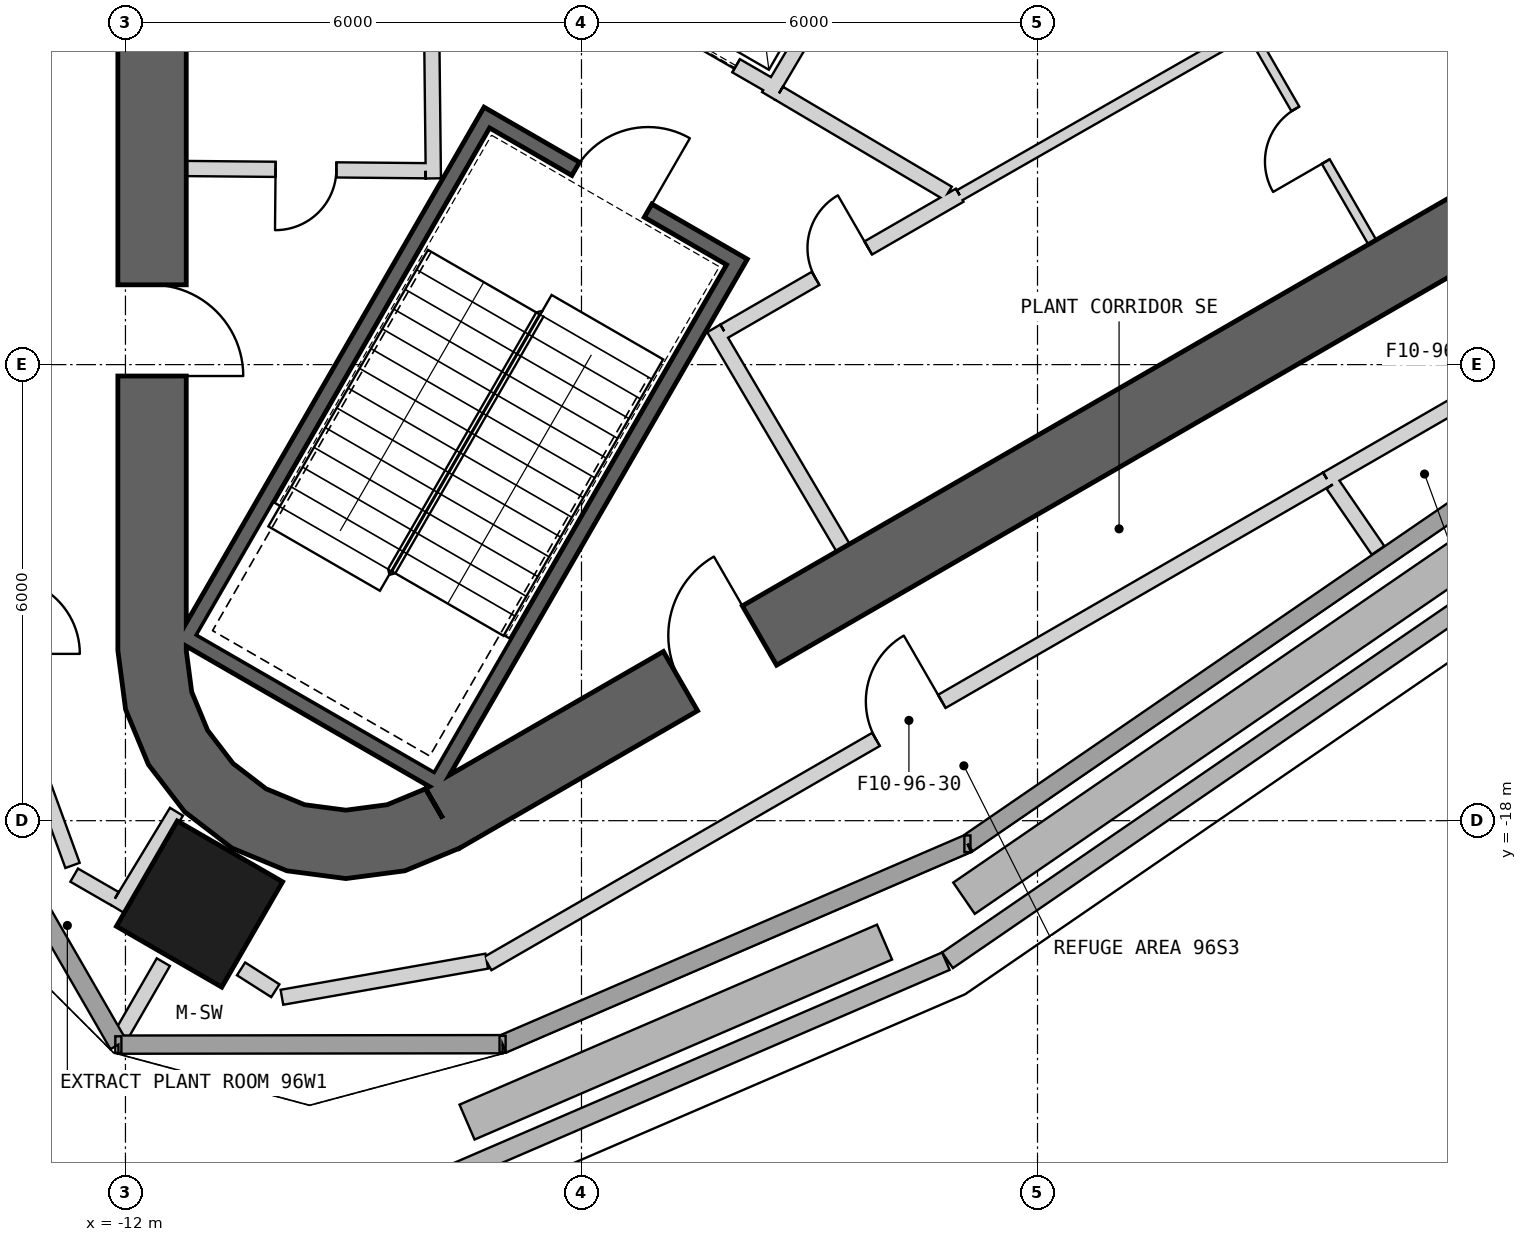
"""IFC4 building model, lengths in metres.
Left out: names, types, materials, properties, quantities, classifications, styles, units other than length and angle.
Written with IfcOpenShell. Run it as: python <this file> out.ifc"""

import sys

from ifc_helpers import new_model, si_unit, direction, frame, frame_2d, origin, origin_2d, place, context, subcontext, project, spatial, polyline, rectangle, outline, extrude, element, fill, save


model = new_model("IFC4")
c1 = context("Model", 3, precision=1e-05, world=origin(), true_north=direction((0.0, 1.0)))
c2 = subcontext(c1, "Body", "Model", "MODEL_VIEW")
j1 = project(units=[si_unit("LENGTHUNIT", "METRE"), si_unit("PLANEANGLEUNIT", "RADIAN")], contexts=[c1])
p1 = place(None, origin())
s1 = spatial("IfcSite", under=j1, at=p1, CompositionType="ELEMENT")
p2 = place(p1, origin())
s2 = spatial("IfcBuilding", under=s1, at=p2, CompositionType="ELEMENT")
p3 = place(p2, frame((0.0, 0.0, 425.3)))
s3 = spatial("IfcBuildingStorey", under=s2, at=p3, CompositionType="ELEMENT", Elevation=425.3)
p4 = place(p3, frame((-11.025, -19.097, -0.25), z_axis=(0.0, 0.0, 1.0), x_axis=(-0.5, -0.866025403784, 0.0)))
e1 = element("IfcColumn", 1, at=p4, inside=s3, PredefinedType="COLUMN", context=c2, shape_type="SweptSolid", body=[
    extrude(rectangle(XDim=1.6, YDim=1.6, at=origin_2d()), origin(), (0.0, 0.0, 1.0), 5.25),
])
p5 = place(p3, frame((-11.65, 15.762, 0.0), z_axis=(0.0, 0.0, 1.0), x_axis=(0.0, -1.0, 0.0)))
e2 = element("IfcWall", 2, at=p5, inside=s3, PredefinedType="SHEAR", context=c2, shape_type="SweptSolid", body=[
    extrude(rectangle(XDim=31.523, YDim=0.9, at=frame_2d((15.762, 0.0))), origin(), (0.0, 0.0, 1.0), 5.0),
])
p6 = place(p5, frame((3.612, 0.0, 0.0)))
e3 = element("IfcOpeningElement", 3, at=p6, cuts=e2, PredefinedType="OPENING", context=c2, shape_type="SweptSolid", body=[
    extrude(rectangle(XDim=1.2, YDim=2.4, at=frame_2d((0.6, 1.2))), frame((0.0, 0.46, 0.0), z_axis=(0.0, -1.0, 0.0), x_axis=(1.0, 0.0, 0.0)), (0.0, 0.0, 1.0), 0.92),
])
p7 = place(p5, frame((26.712, 0.0, 0.0)))
e4 = element("IfcOpeningElement", 4, at=p7, cuts=e2, PredefinedType="OPENING", context=c2, shape_type="SweptSolid", body=[
    extrude(rectangle(XDim=1.2, YDim=2.4, at=frame_2d((0.6, 1.2))), frame((0.0, 0.46, 0.0), z_axis=(0.0, -1.0, 0.0), x_axis=(1.0, 0.0, 0.0)), (0.0, 0.0, 1.0), 0.92),
])
p8 = place(p3, frame((-7.825, -17.97, 0.0), z_axis=(0.0, 0.0, 1.0), x_axis=(0.866028369851, 0.499994862586, 0.0)))
e5 = element("IfcWall", 5, at=p8, inside=s3, PredefinedType="SHEAR", context=c2, shape_type="SweptSolid", body=[
    extrude(rectangle(XDim=31.523, YDim=0.9, at=frame_2d((15.762, 0.0))), origin(), (0.0, 0.0, 1.0), 5.0),
])
p9 = place(p8, frame((17.862, 0.0, 0.0)))
e6 = element("IfcOpeningElement", 6, at=p9, cuts=e5, PredefinedType="OPENING", context=c2, shape_type="SweptSolid", body=[
    extrude(rectangle(XDim=1.2, YDim=2.4, at=frame_2d((0.6, 1.2))), frame((0.0, 0.46, 0.0), z_axis=(0.0, -1.0, 0.0), x_axis=(1.0, 0.0, 0.0)), (0.0, 0.0, 1.0), 0.92),
])
p10 = place(p8, frame((20.562, 0.0, 0.0)))
e7 = element("IfcOpeningElement", 7, at=p10, cuts=e5, PredefinedType="OPENING", context=c2, shape_type="SweptSolid", body=[
    extrude(rectangle(XDim=1.2, YDim=2.4, at=frame_2d((0.6, 1.2))), frame((0.0, 0.46, 0.0), z_axis=(0.0, -1.0, 0.0), x_axis=(1.0, 0.0, 0.0)), (0.0, 0.0, 1.0), 0.92),
])
p11 = place(p8, frame((26.712, 0.0, 0.0)))
e8 = element("IfcOpeningElement", 8, at=p11, cuts=e5, PredefinedType="OPENING", context=c2, shape_type="SweptSolid", body=[
    extrude(rectangle(XDim=1.2, YDim=2.4, at=frame_2d((0.6, 1.2))), frame((0.0, 0.46, 0.0), z_axis=(0.0, -1.0, 0.0), x_axis=(1.0, 0.0, 0.0)), (0.0, 0.0, 1.0), 0.92),
])
p12 = place(p8, frame((3.612, 0.0, 0.0)))
e9 = element("IfcOpeningElement", 9, at=p12, cuts=e5, PredefinedType="OPENING", context=c2, shape_type="SweptSolid", body=[
    extrude(rectangle(XDim=1.2, YDim=2.4, at=frame_2d((0.6, 1.2))), frame((0.0, 0.46, 0.0), z_axis=(0.0, -1.0, 0.0), x_axis=(1.0, 0.0, 0.0)), (0.0, 0.0, 1.0), 0.92),
])
p13 = place(p3, origin())
e10 = element("IfcWall", 10, at=p13, inside=s3, PredefinedType="SHEAR", context=c2, shape_type="SweptSolid", body=[
    extrude(outline(polyline([(-12.1, -15.762), (-11.998, -16.538), (-11.698, -17.262), (-11.221, -17.883), (-10.6, -18.36), (-9.876, -18.659), (-9.1, -18.762), (-8.323, -18.659), (-7.6, -18.36), (-8.05, -17.58), (-8.556, -17.79), (-9.1, -17.862), (-9.644, -17.79), (-10.15, -17.58), (-10.585, -17.247), (-10.919, -16.812), (-11.128, -16.305), (-11.2, -15.762), (-12.1, -15.762)])), origin(), (0.0, 0.0, 1.0), 5.0),
])
p14 = place(p3, frame((-14.612, -16.579, 0.0), z_axis=(0.0, 0.0, 1.0), x_axis=(0.499577110492, -0.866269421527, 0.0)))
e11 = element("IfcWall", 11, at=p14, inside=s3, PredefinedType="SOLIDWALL", context=c2, shape_type="SweptSolid", body=[
    extrude(rectangle(XDim=5.041, YDim=0.24, at=frame_2d((2.521, 0.0))), origin(), (0.0, 0.0, 1.0), 4.75),
])
p15 = place(p3, frame((-12.094, -20.946, 0.0), z_axis=(0.0, 0.0, 1.0), x_axis=(0.999999328327, 0.001159027569, 0.0)))
e12 = element("IfcWall", 12, at=p15, inside=s3, PredefinedType="SOLIDWALL", context=c2, shape_type="SweptSolid", body=[
    extrude(rectangle(XDim=5.055, YDim=0.24, at=frame_2d((2.528, 0.0))), origin(), (0.0, 0.0, 1.0), 4.75),
])
p16 = place(p3, frame((-7.038, -20.94, 0.0), z_axis=(0.0, 0.0, 1.0), x_axis=(0.918295366669, 0.395895970621, 0.0)))
e13 = element("IfcWall", 13, at=p16, inside=s3, PredefinedType="SOLIDWALL", context=c2, shape_type="SweptSolid", body=[
    extrude(rectangle(XDim=6.66, YDim=0.24, at=frame_2d((3.33, 0.0))), origin(), (0.0, 0.0, 1.0), 4.75),
])
p17 = place(p3, frame((-0.922, -18.304, 0.0), z_axis=(0.0, 0.0, 1.0), x_axis=(0.824481583442, 0.565888786393, 0.0)))
e14 = element("IfcWall", 14, at=p17, inside=s3, PredefinedType="SOLIDWALL", context=c2, shape_type="SweptSolid", body=[
    extrude(rectangle(XDim=19.966, YDim=0.24, at=frame_2d((9.983, 0.0))), origin(), (0.0, 0.0, 1.0), 4.75),
])
p18 = place(p3, frame((16.933, -7.402, 0.04), z_axis=(0.0, 0.0, 1.0), x_axis=(-0.824479303652, -0.565892107958, 0.0)))
e15 = element("IfcWall", 15, at=p18, inside=s3, PredefinedType="PARAPET", context=c2, shape_type="SweptSolid", body=[
    extrude(rectangle(XDim=21.975, YDim=0.25, at=frame_2d((10.987, 0.0))), origin(), (0.0, 0.0, 1.0), 1.2),
])
p19 = place(p3, frame((-1.206, -19.849, 0.04), z_axis=(0.0, 0.0, 1.0), x_axis=(-0.918314383553, -0.395851857339, 0.0)))
e16 = element("IfcWall", 16, at=p19, inside=s3, PredefinedType="PARAPET", context=c2, shape_type="SweptSolid", body=[
    extrude(rectangle(XDim=7.254, YDim=0.25, at=frame_2d((3.627, 0.0))), origin(), (0.0, 0.0, 1.0), 1.2),
])
p20 = place(p3, frame((16.181, -7.25, 0.04), z_axis=(0.0, 0.0, 1.0), x_axis=(-0.824481781464, -0.56588849788, 0.0)))
e17 = element("IfcWall", 17, at=p20, inside=s3, PredefinedType="PARAPET", context=c2, shape_type="SweptSolid", body=[
    extrude(rectangle(XDim=20.799, YDim=0.5, at=frame_2d((10.399, 0.0))), origin(), (0.0, 0.0, 1.0), 0.6),
])
p21 = place(p3, frame((-2.012, -19.597, 0.04), z_axis=(0.0, 0.0, 1.0), x_axis=(-0.918313342829, -0.395854271649, 0.0)))
e18 = element("IfcWall", 18, at=p21, inside=s3, PredefinedType="PARAPET", context=c2, shape_type="SweptSolid", body=[
    extrude(rectangle(XDim=5.982, YDim=0.5, at=frame_2d((2.991, 0.0))), origin(), (0.0, 0.0, 1.0), 0.6),
])
p22 = place(p3, frame((6.795, -9.01, 0.0), z_axis=(0.0, 0.0, 1.0), x_axis=(-0.499984717929, 0.866034226713, 0.0)))
e19 = element("IfcWall", 19, at=p22, inside=s3, PredefinedType="PLUMBINGWALL", context=c2, shape_type="SweptSolid", body=[
    extrude(rectangle(XDim=3.25, YDim=0.2, at=frame_2d((1.625, 0.0))), origin(), (0.0, 0.0, 1.0), 4.75),
])
p23 = place(p3, frame((-3.905, -10.563, -0.25), z_axis=(0.0, 0.0, 1.0), x_axis=(-0.500012932018, -0.866017937352, 0.0)))
e20 = element("IfcWall", 20, at=p23, inside=s3, PredefinedType="SHEAR", context=c2, shape_type="SweptSolid", body=[
    extrude(rectangle(XDim=8.1, YDim=0.2, at=frame_2d((4.05, 0.0))), origin(), (0.0, 0.0, 1.0), 5.0),
])
p24 = place(p3, frame((-11.282, -15.541, -0.25), z_axis=(0.0, 0.0, 1.0), x_axis=(0.866000483506, -0.500043160704, 0.0)))
e21 = element("IfcWall", 21, at=p24, inside=s3, PredefinedType="SHEAR", context=c2, shape_type="SweptSolid", body=[
    extrude(rectangle(XDim=3.8, YDim=0.2, at=frame_2d((1.9, 0.0))), origin(), (0.0, 0.0, 1.0), 5.0),
])
p25 = place(p3, frame((-7.196, -8.663, -0.25), z_axis=(0.0, 0.0, 1.0), x_axis=(-0.499997992926, -0.866026562566, 0.0)))
e22 = element("IfcWall", 22, at=p25, inside=s3, PredefinedType="SHEAR", context=c2, shape_type="SweptSolid", body=[
    extrude(rectangle(XDim=7.9, YDim=0.2, at=frame_2d((3.95, 0.0))), origin(), (0.0, 0.0, 1.0), 5.0),
])
p26 = place(p3, frame((-4.041, -10.599, -0.25), z_axis=(0.0, 0.0, 1.0), x_axis=(-0.866047807691, 0.499961193289, 0.0)))
e23 = element("IfcWall", 23, at=p26, inside=s3, PredefinedType="SHEAR", context=c2, shape_type="SweptSolid", body=[
    extrude(rectangle(XDim=3.6, YDim=0.2, at=frame_2d((1.8, 0.0))), origin(), (0.0, 0.0, 1.0), 5.0),
])
p27 = place(p26, frame((1.25, 0.0, 0.25)))
e24 = element("IfcOpeningElement", 24, at=p27, cuts=e23, PredefinedType="OPENING", context=c2, shape_type="SweptSolid", body=[
    extrude(rectangle(XDim=1.1, YDim=2.1, at=frame_2d((0.55, 1.05))), frame((0.0, 0.11, 0.0), z_axis=(0.0, -1.0, 0.0), x_axis=(1.0, 0.0, 0.0)), (0.0, 0.0, 1.0), 0.22),
])
p28 = place(p3, frame((-3.446, -8.368, 0.0), z_axis=(0.0, 0.0, 1.0), x_axis=(-0.866024647952, 0.500001309137, 0.0)))
e25 = element("IfcWall", 25, at=p28, inside=s3, PredefinedType="PLUMBINGWALL", context=c2, shape_type="SweptSolid", body=[
    extrude(rectangle(XDim=2.4, YDim=0.2, at=frame_2d((1.2, 0.0))), origin(), (0.0, 0.0, 1.0), 4.75),
])
p29 = place(p28, frame((0.6, 0.0, 0.0)))
e26 = element("IfcOpeningElement", 26, at=p29, cuts=e25, PredefinedType="OPENING", context=c2, shape_type="SweptSolid", body=[
    extrude(rectangle(XDim=1.2, YDim=2.4, at=frame_2d((0.6, 1.2))), frame((0.0, 0.11, 0.0), z_axis=(0.0, -1.0, 0.0), x_axis=(1.0, 0.0, 0.0)), (0.0, 0.0, 1.0), 0.22),
])
p30 = place(p3, frame((-2.008, -5.878, 0.0), z_axis=(0.0, 0.0, 1.0), x_axis=(-0.508893526607, -0.860829471253, 0.0)))
e27 = element("IfcWall", 27, at=p30, inside=s3, PredefinedType="PLUMBINGWALL", context=c2, shape_type="SweptSolid", body=[
    extrude(rectangle(XDim=3.005, YDim=0.2, at=frame_2d((1.502, 0.0))), origin(), (0.0, 0.0, 1.0), 4.75),
])
p31 = place(p3, frame((-7.949, -9.55, 0.0), z_axis=(0.0, 0.0, 1.0), x_axis=(-0.011121475088, 0.999938154483, 0.0)))
e28 = element("IfcWall", 28, at=p31, inside=s3, PredefinedType="PARTITIONING", context=c2, shape_type="SweptSolid", body=[
    extrude(rectangle(XDim=2.7, YDim=0.2, at=frame_2d((1.35, 0.0))), origin(), (0.0, 0.0, 1.0), 4.75),
])
p32 = place(p3, frame((-11.2, -9.42, 0.0), z_axis=(0.0, 0.0, 1.0), x_axis=(0.999957467379, -0.009222983926, 0.0)))
e29 = element("IfcWall", 29, at=p32, inside=s3, PredefinedType="PARTITIONING", context=c2, shape_type="SweptSolid", body=[
    extrude(rectangle(XDim=3.15, YDim=0.2, at=frame_2d((1.575, 0.0))), origin(), (0.0, 0.0, 1.0), 4.75),
])
p33 = place(p32, frame((1.175, 0.0, 0.0)))
e30 = element("IfcOpeningElement", 30, at=p33, cuts=e29, PredefinedType="OPENING", context=c2, shape_type="SweptSolid", body=[
    extrude(rectangle(XDim=0.8, YDim=2.1, at=frame_2d((0.4, 1.05))), frame((0.0, 0.11, 0.0), z_axis=(0.0, -1.0, 0.0), x_axis=(1.0, 0.0, 0.0)), (0.0, 0.0, 1.0), 0.22),
])
p34 = place(p3, frame((4.405, -10.389, 0.0), z_axis=(0.0, 0.0, 1.0), x_axis=(-0.500017246033, 0.866015446554, 0.0)))
e31 = element("IfcWall", 31, at=p34, inside=s3, PredefinedType="PARTITIONING", context=c2, shape_type="SweptSolid", body=[
    extrude(rectangle(XDim=3.25, YDim=0.12, at=frame_2d((1.625, 0.0))), origin(), (0.0, 0.0, 1.0), 4.75),
])
p35 = place(p34, frame((1.225, 0.0, 0.0)))
e32 = element("IfcOpeningElement", 32, at=p35, cuts=e31, PredefinedType="OPENING", context=c2, shape_type="SweptSolid", body=[
    extrude(rectangle(XDim=0.8, YDim=2.1, at=frame_2d((0.4, 1.05))), frame((0.0, 0.07, 0.0), z_axis=(0.0, -1.0, 0.0), x_axis=(1.0, 0.0, 0.0)), (0.0, 0.0, 1.0), 0.14),
])
p36 = place(p3, frame((-4.26, -11.524, 0.0), z_axis=(0.0, 0.0, 1.0), x_axis=(0.507997497166, -0.861358544901, 0.0)))
e33 = element("IfcWall", 33, at=p36, inside=s3, PredefinedType="PARTITIONING", context=c2, shape_type="SweptSolid", body=[
    extrude(rectangle(XDim=3.35, YDim=0.2, at=frame_2d((1.675, 0.0))), origin(), (0.0, 0.0, 1.0), 4.75),
])
p37 = place(p3, frame((-1.024, -9.771, 0.0), z_axis=(0.0, 0.0, 1.0), x_axis=(-0.866029903013, -0.499992207027, 0.0)))
e34 = element("IfcWall", 34, at=p37, inside=s3, PredefinedType="PARTITIONING", context=c2, shape_type="SweptSolid", body=[
    extrude(rectangle(XDim=3.578, YDim=0.2, at=frame_2d((1.789, 0.0))), origin(), (0.0, 0.0, 1.0), 4.75),
])
p38 = place(p37, frame((1.389, 0.0, 0.0)))
e35 = element("IfcOpeningElement", 35, at=p38, cuts=e34, PredefinedType="OPENING", context=c2, shape_type="SweptSolid", body=[
    extrude(rectangle(XDim=0.8, YDim=2.1, at=frame_2d((0.4, 1.05))), frame((0.0, 0.11, 0.0), z_axis=(0.0, -1.0, 0.0), x_axis=(1.0, 0.0, 0.0)), (0.0, 0.0, 1.0), 0.22),
])
p39 = place(p3, frame((-1.024, -9.771, 0.0), z_axis=(0.0, 0.0, 1.0), x_axis=(0.868110220015, 0.496371479746, 0.0)))
e36 = element("IfcWall", 36, at=p39, inside=s3, PredefinedType="PLUMBINGWALL", context=c2, shape_type="SweptSolid", body=[
    extrude(rectangle(XDim=7.123, YDim=0.15, at=frame_2d((3.561, 0.0))), origin(), (0.0, 0.0, 1.0), 4.75),
])
p40 = place(p3, frame((-3.401, -8.43, 0.0), z_axis=(0.0, 0.0, 1.0), x_axis=(0.860630814782, -0.509229418482, 0.0)))
e37 = element("IfcWall", 37, at=p40, inside=s3, PredefinedType="PARTITIONING", context=c2, shape_type="SweptSolid", body=[
    extrude(rectangle(XDim=2.582, YDim=0.2, at=frame_2d((1.291, 0.0))), origin(), (0.0, 0.0, 1.0), 4.75),
])
p41 = place(p3, frame((-12.104, -19.161, 0.0), z_axis=(0.0, 0.0, 1.0), x_axis=(0.518475368733, 0.855092563421, 0.0)))
e38 = element("IfcWall", 38, at=p41, inside=s3, PredefinedType="PARTITIONING", context=c2, shape_type="SweptSolid", body=[
    extrude(rectangle(XDim=1.496, YDim=0.2, at=frame_2d((0.748, 0.0))), origin(), (0.0, 0.0, 1.0), 4.75),
])
p42 = place(p3, frame((-12.675, -18.717, 0.0), z_axis=(0.0, 0.0, 1.0), x_axis=(0.866047486323, -0.49996174997, 0.0)))
e39 = element("IfcWall", 39, at=p42, inside=s3, PredefinedType="PARTITIONING", context=c2, shape_type="SweptSolid", body=[
    extrude(rectangle(XDim=0.618, YDim=0.2, at=frame_2d((0.309, 0.0))), origin(), (0.0, 0.0, 1.0), 4.75),
])
p43 = place(p3, frame((-13.634, -16.011, 0.0), z_axis=(0.0, 0.0, 1.0), x_axis=(0.342043269434, -0.939684203248, 0.0)))
e40 = element("IfcWall", 40, at=p43, inside=s3, PredefinedType="PARTITIONING", context=c2, shape_type="SweptSolid", body=[
    extrude(rectangle(XDim=2.742, YDim=0.2, at=frame_2d((1.371, 0.0))), origin(), (0.0, 0.0, 1.0), 4.75),
])
p44 = place(p3, frame((-11.501, -19.861, 0.0), z_axis=(0.0, 0.0, 1.0), x_axis=(-0.500107244371, -0.865963477364, 0.0)))
e41 = element("IfcWall", 41, at=p44, inside=s3, PredefinedType="PARTITIONING", context=c2, shape_type="SweptSolid", body=[
    extrude(rectangle(XDim=1.098, YDim=0.2, at=frame_2d((0.549, 0.0))), origin(), (0.0, 0.0, 1.0), 3.93),
])
p45 = place(p3, frame((-7.234, -19.881, 0.0), z_axis=(0.0, 0.0, 1.0), x_axis=(0.866028703517, 0.499994284652, 0.0)))
e42 = element("IfcWall", 42, at=p45, inside=s3, PredefinedType="PARTITIONING", context=c2, shape_type="SweptSolid", body=[
    extrude(rectangle(XDim=12.75, YDim=0.2, at=frame_2d((6.375, 0.0))), origin(), (0.0, 0.0, 1.0), 4.75),
])
p46 = place(p45, frame((5.9, 0.0, 0.0)))
e43 = element("IfcOpeningElement", 43, at=p46, cuts=e42, PredefinedType="OPENING", context=c2, shape_type="SweptSolid", body=[
    extrude(rectangle(XDim=1.0, YDim=2.1, at=frame_2d((0.5, 1.05))), frame((0.0, 0.11, 0.0), z_axis=(0.0, -1.0, 0.0), x_axis=(1.0, 0.0, 0.0)), (0.0, 0.0, 1.0), 0.22),
])
p47 = place(p3, frame((3.808, -13.506, 0.0), z_axis=(0.0, 0.0, 1.0), x_axis=(0.866031500321, 0.49998944034, 0.0)))
e44 = element("IfcWall", 44, at=p47, inside=s3, PredefinedType="PARTITIONING", context=c2, shape_type="SweptSolid", body=[
    extrude(rectangle(XDim=6.649, YDim=0.2, at=frame_2d((3.325, 0.0))), origin(), (0.0, 0.0, 1.0), 4.75),
])
p48 = place(p47, frame((2.856, 0.0, 0.0)))
e45 = element("IfcOpeningElement", 45, at=p48, cuts=e44, PredefinedType="OPENING", context=c2, shape_type="SweptSolid", body=[
    extrude(rectangle(XDim=1.0, YDim=2.1, at=frame_2d((0.5, 1.05))), frame((0.0, 0.11, 0.0), z_axis=(0.0, -1.0, 0.0), x_axis=(1.0, 0.0, 0.0)), (0.0, 0.0, 1.0), 0.22),
])
p49 = place(p3, frame((-9.941, -20.323, 0.0), z_axis=(0.0, 0.0, 1.0), x_axis=(0.984814976585, 0.173607205765, 0.0)))
e46 = element("IfcWall", 46, at=p49, inside=s3, PredefinedType="PARTITIONING", context=c2, shape_type="SweptSolid", body=[
    extrude(rectangle(XDim=2.737, YDim=0.2, at=frame_2d((1.368, 0.0))), origin(), (0.0, 0.0, 1.0), 4.75),
])
p50 = place(p3, frame((-10.479, -19.95, 0.0), z_axis=(0.0, 0.0, 1.0), x_axis=(0.84332290589, -0.537407179335, 0.0)))
e47 = element("IfcWall", 47, at=p50, inside=s3, PredefinedType="PARTITIONING", context=c2, shape_type="SweptSolid", body=[
    extrude(rectangle(XDim=0.535, YDim=0.2, at=frame_2d((0.267, 0.0))), origin(), (0.0, 0.0, 1.0), 4.75),
])
p51 = place(p3, frame((4.481, -14.444, 0.0), z_axis=(0.0, 0.0, 1.0), x_axis=(-0.565839404431, 0.824515474927, 0.0)))
e48 = element("IfcWall", 48, at=p51, inside=s3, PredefinedType="PARTITIONING", context=c2, shape_type="SweptSolid", body=[
    extrude(rectangle(XDim=1.052, YDim=0.2, at=frame_2d((0.526, 0.0))), origin(), (0.0, 0.0, 1.0), 4.75),
])
p52 = place(p27, origin())
e49 = element("IfcDoor", 49, at=p52, inside=s3, OperationType="SINGLE_SWING_LEFT", PredefinedType="USERDEFINED", context=c2, shape_type="SweptSolid", body=[
    extrude(rectangle(XDim=1.1, YDim=2.1, at=frame_2d((0.55, 1.05))), frame((0.0, 0.025, 0.0), z_axis=(0.0, -1.0, 0.0), x_axis=(1.0, 0.0, 0.0)), (0.0, 0.0, 1.0), 0.05),
])
fill(e24, e49)
p53 = place(p29, origin())
e50 = element("IfcDoor", 50, at=p53, inside=s3, OperationType="SLIDING_TO_LEFT", PredefinedType="USERDEFINED", context=c2, shape_type="SweptSolid", body=[
    extrude(rectangle(XDim=1.2, YDim=2.4, at=frame_2d((0.6, 1.2))), frame((0.0, 0.025, 0.0), z_axis=(0.0, -1.0, 0.0), x_axis=(1.0, 0.0, 0.0)), (0.0, 0.0, 1.0), 0.05),
])
fill(e26, e50)
p54 = place(p33, origin())
e51 = element("IfcDoor", 51, at=p54, inside=s3, OperationType="SINGLE_SWING_LEFT", PredefinedType="USERDEFINED", context=c2, shape_type="SweptSolid", body=[
    extrude(rectangle(XDim=0.8, YDim=2.1, at=frame_2d((0.4, 1.05))), frame((0.0, 0.025, 0.0), z_axis=(0.0, -1.0, 0.0), x_axis=(1.0, 0.0, 0.0)), (0.0, 0.0, 1.0), 0.05),
])
fill(e30, e51)
p55 = place(p38, origin())
e52 = element("IfcDoor", 52, at=p55, inside=s3, OperationType="SINGLE_SWING_LEFT", PredefinedType="USERDEFINED", context=c2, shape_type="SweptSolid", body=[
    extrude(rectangle(XDim=0.8, YDim=2.1, at=frame_2d((0.4, 1.05))), frame((0.0, 0.025, 0.0), z_axis=(0.0, -1.0, 0.0), x_axis=(1.0, 0.0, 0.0)), (0.0, 0.0, 1.0), 0.05),
])
fill(e35, e52)
p56 = place(p35, origin())
e53 = element("IfcDoor", 53, at=p56, inside=s3, OperationType="SINGLE_SWING_LEFT", PredefinedType="USERDEFINED", context=c2, shape_type="SweptSolid", body=[
    extrude(rectangle(XDim=0.8, YDim=2.1, at=frame_2d((0.4, 1.05))), frame((0.0, 0.025, 0.0), z_axis=(0.0, -1.0, 0.0), x_axis=(1.0, 0.0, 0.0)), (0.0, 0.0, 1.0), 0.05),
])
fill(e32, e53)
p57 = place(p46, origin())
e54 = element("IfcDoor", 54, at=p57, inside=s3, OperationType="SINGLE_SWING_RIGHT", PredefinedType="USERDEFINED", context=c2, shape_type="SweptSolid", body=[
    extrude(rectangle(XDim=1.0, YDim=2.1, at=frame_2d((0.5, 1.05))), frame((0.0, 0.025, 0.0), z_axis=(0.0, -1.0, 0.0), x_axis=(1.0, 0.0, 0.0)), (0.0, 0.0, 1.0), 0.05),
])
fill(e43, e54)
p58 = place(p7, origin())
e55 = element("IfcDoor", 55, at=p58, inside=s3, OperationType="SINGLE_SWING_RIGHT", PredefinedType="USERDEFINED", context=c2, shape_type="SweptSolid", body=[
    extrude(rectangle(XDim=1.2, YDim=2.4, at=frame_2d((0.6, 1.2))), frame((0.0, 0.025, 0.0), z_axis=(0.0, -1.0, 0.0), x_axis=(1.0, 0.0, 0.0)), (0.0, 0.0, 1.0), 0.05),
])
fill(e4, e55)
p59 = place(p12, origin())
e56 = element("IfcDoor", 56, at=p59, inside=s3, OperationType="SINGLE_SWING_RIGHT", PredefinedType="USERDEFINED", context=c2, shape_type="SweptSolid", body=[
    extrude(rectangle(XDim=1.2, YDim=2.4, at=frame_2d((0.6, 1.2))), frame((0.0, 0.025, 0.0), z_axis=(0.0, -1.0, 0.0), x_axis=(1.0, 0.0, 0.0)), (0.0, 0.0, 1.0), 0.05),
])
fill(e9, e56)
save(model, sys.argv[1])
